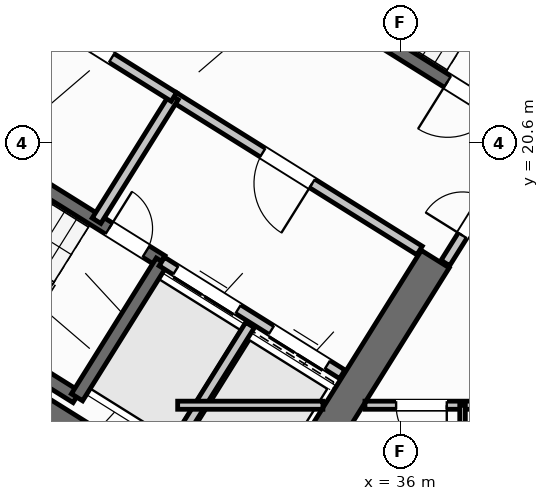
"""IFC4 building model, lengths in metres.
Left out: names, types, materials, properties, quantities, classifications, styles, units other than length and angle.
Written with IfcOpenShell. Run it as: python <this file> out.ifc"""

import sys

from ifc_helpers import new_model, si_unit, direction, frame, frame_2d, origin, place, context, subcontext, project, spatial, rectangle, extrude, source, transform, mapped, element, fill, save


model = new_model("IFC4")
c1 = context("Model", 3, precision=1e-05, world=origin(), true_north=direction((0.0, 1.0)))
c2 = subcontext(c1, "Body", "Model", "MODEL_VIEW")
j1 = project(units=[si_unit("LENGTHUNIT", "METRE"), si_unit("PLANEANGLEUNIT", "RADIAN")], contexts=[c1])
p1 = place(None, origin())
s1 = spatial("IfcSite", under=j1, at=p1, CompositionType="ELEMENT")
p2 = place(p1, origin())
s2 = spatial("IfcBuilding", under=s1, at=p2, CompositionType="ELEMENT")
p3 = place(p2, frame((0.0, 0.0, 31.2)))
s3 = spatial("IfcBuildingStorey", under=s2, at=p3, CompositionType="ELEMENT", Elevation=31.2)
p4 = place(p3, frame((33.409, 12.45, 0.0), z_axis=(0.0, 0.0, 1.0), x_axis=(-0.848051132073, 0.529914405721, 0.0)))
e1 = element("IfcWall", 1, at=p4, inside=s3, PredefinedType="SHEAR", context=c2, shape_type="SweptSolid", body=[
    extrude(rectangle(XDim=13.24, YDim=0.65, at=frame_2d((6.62, 0.0))), origin(), (0.0, 0.0, 1.0), 3.35),
])
p5 = place(p3, frame((36.683, 18.304, 0.0), z_axis=(0.0, 0.0, 1.0), x_axis=(-0.529899109053, -0.848060690178, 0.0)))
e2 = element("IfcWall", 2, at=p5, inside=s3, PredefinedType="SHEAR", context=c2, shape_type="SweptSolid", body=[
    extrude(rectangle(XDim=6.375, YDim=0.65, at=frame_2d((3.188, 0.0))), origin(), (0.0, 0.0, 1.0), 3.35),
])
p6 = place(p3, frame((29.268, 6.429, 0.0), z_axis=(0.0, 0.0, 1.0), x_axis=(-0.848049971435, 0.529916263149, 0.0)))
e3 = element("IfcWall", 3, at=p6, inside=s3, PredefinedType="STANDARD", context=c2, shape_type="SweptSolid", body=[
    extrude(rectangle(XDim=31.588, YDim=0.32, at=frame_2d((15.794, 0.0))), origin(), (0.0, 0.0, 1.0), 3.35),
])
p7 = place(p6, frame((16.362, 0.0, 0.0)))
e4 = element("IfcOpeningElement", 4, at=p7, cuts=e3, PredefinedType="OPENING", context=c2, shape_type="SweptSolid", body=[
    extrude(rectangle(XDim=1.2, YDim=2.15, at=frame_2d((0.6, 1.075))), frame((0.0, 0.17, 0.0), z_axis=(0.0, -1.0, 0.0), x_axis=(1.0, 0.0, 0.0)), (0.0, 0.0, 1.0), 0.34),
])
p8 = place(p6, frame((2.989, 0.0, 0.8)))
e5 = element("IfcOpeningElement", 5, at=p8, cuts=e3, PredefinedType="OPENING", context=c2, shape_type="SweptSolid", body=[
    extrude(rectangle(XDim=2.1, YDim=1.55, at=frame_2d((1.05, 0.775))), frame((0.0, 0.17, 0.0), z_axis=(0.0, -1.0, 0.0), x_axis=(1.0, 0.0, 0.0)), (0.0, 0.0, 1.0), 0.34),
])
p9 = place(p6, frame((8.359, 0.0, 0.8)))
e6 = element("IfcOpeningElement", 6, at=p9, cuts=e3, PredefinedType="OPENING", context=c2, shape_type="SweptSolid", body=[
    extrude(rectangle(XDim=2.1, YDim=1.55, at=frame_2d((1.05, 0.775))), frame((0.0, 0.17, 0.0), z_axis=(0.0, -1.0, 0.0), x_axis=(1.0, 0.0, 0.0)), (0.0, 0.0, 1.0), 0.34),
])
p10 = place(p6, frame((13.284, 0.0, 0.95)))
e7 = element("IfcOpeningElement", 7, at=p10, cuts=e3, PredefinedType="OPENING", context=c2, shape_type="SweptSolid", body=[
    extrude(rectangle(XDim=1.2, YDim=1.4, at=frame_2d((0.6, 0.7))), frame((0.0, 0.17, 0.0), z_axis=(0.0, -1.0, 0.0), x_axis=(1.0, 0.0, 0.0)), (0.0, 0.0, 1.0), 0.34),
])
p11 = place(p6, frame((29.188, 0.0, 0.95)))
e8 = element("IfcOpeningElement", 8, at=p11, cuts=e3, PredefinedType="OPENING", context=c2, shape_type="SweptSolid", body=[
    extrude(rectangle(XDim=1.2, YDim=1.4, at=frame_2d((0.6, 0.7))), frame((0.0, 0.17, 0.0), z_axis=(0.0, -1.0, 0.0), x_axis=(1.0, 0.0, 0.0)), (0.0, 0.0, 1.0), 0.34),
])
p12 = place(p6, frame((19.11, 0.0, 1.0)))
e9 = element("IfcOpeningElement", 9, at=p12, cuts=e3, PredefinedType="OPENING", context=c2, shape_type="SweptSolid", body=[
    extrude(rectangle(XDim=0.9, YDim=1.25, at=frame_2d((0.45, 0.625))), frame((0.0, 0.17, 0.0), z_axis=(0.0, -1.0, 0.0), x_axis=(1.0, 0.0, 0.0)), (0.0, 0.0, 1.0), 0.34),
])
p13 = place(p6, frame((21.226, 0.0, 1.0)))
e10 = element("IfcOpeningElement", 10, at=p13, cuts=e3, PredefinedType="OPENING", context=c2, shape_type="SweptSolid", body=[
    extrude(rectangle(XDim=0.9, YDim=1.25, at=frame_2d((0.45, 0.625))), frame((0.0, 0.17, 0.0), z_axis=(0.0, -1.0, 0.0), x_axis=(1.0, 0.0, 0.0)), (0.0, 0.0, 1.0), 0.34),
])
p14 = place(p6, frame((23.014, 0.0, 1.0)))
e11 = element("IfcOpeningElement", 11, at=p14, cuts=e3, PredefinedType="OPENING", context=c2, shape_type="SweptSolid", body=[
    extrude(rectangle(XDim=0.9, YDim=1.25, at=frame_2d((0.45, 0.625))), frame((0.0, 0.17, 0.0), z_axis=(0.0, -1.0, 0.0), x_axis=(1.0, 0.0, 0.0)), (0.0, 0.0, 1.0), 0.34),
])
p15 = place(p6, frame((24.802, 0.0, 1.0)))
e12 = element("IfcOpeningElement", 12, at=p15, cuts=e3, PredefinedType="OPENING", context=c2, shape_type="SweptSolid", body=[
    extrude(rectangle(XDim=0.9, YDim=1.25, at=frame_2d((0.45, 0.625))), frame((0.0, 0.17, 0.0), z_axis=(0.0, -1.0, 0.0), x_axis=(1.0, 0.0, 0.0)), (0.0, 0.0, 1.0), 0.34),
])
p16 = place(p6, frame((26.59, 0.0, 1.0)))
e13 = element("IfcOpeningElement", 13, at=p16, cuts=e3, PredefinedType="OPENING", context=c2, shape_type="SweptSolid", body=[
    extrude(rectangle(XDim=0.9, YDim=1.25, at=frame_2d((0.45, 0.625))), frame((0.0, 0.17, 0.0), z_axis=(0.0, -1.0, 0.0), x_axis=(1.0, 0.0, 0.0)), (0.0, 0.0, 1.0), 0.34),
])
p17 = place(p3, frame((29.605, 15.581, 0.0), z_axis=(0.0, 0.0, 1.0), x_axis=(-0.848036911448, 0.529937163087, 0.0)))
e14 = element("IfcWall", 14, at=p17, inside=s3, PredefinedType="SHEAR", context=c2, shape_type="SweptSolid", body=[
    extrude(rectangle(XDim=7.46, YDim=0.26, at=frame_2d((3.73, 0.0))), origin(), (0.0, 0.0, 1.0), 3.35),
])
p18 = place(p3, frame((31.28, 18.261, 0.0), z_axis=(0.0, 0.0, 1.0), x_axis=(-0.848051618787, 0.529913626805, 0.0)))
e15 = element("IfcWall", 15, at=p18, inside=s3, PredefinedType="SHEAR", context=c2, shape_type="SweptSolid", body=[
    extrude(rectangle(XDim=7.46, YDim=0.26, at=frame_2d((3.73, 0.0))), origin(), (0.0, 0.0, 1.0), 3.35),
])
p19 = place(p18, frame((0.36, 0.0, 0.0)))
e16 = element("IfcOpeningElement", 16, at=p19, cuts=e15, PredefinedType="OPENING", context=c2, shape_type="SweptSolid", body=[
    extrude(rectangle(XDim=0.86, YDim=2.05, at=frame_2d((0.43, 1.025))), frame((0.0, 0.14, 0.0), z_axis=(0.0, -1.0, 0.0), x_axis=(1.0, 0.0, 0.0)), (0.0, 0.0, 1.0), 0.28),
])
p20 = place(p3, frame((31.288, 18.256, 0.0), z_axis=(0.0, 0.0, 1.0), x_axis=(-0.529943379326, -0.848033026897, 0.0)))
e17 = element("IfcWall", 17, at=p20, inside=s3, PredefinedType="SHEAR", context=c2, shape_type="SweptSolid", body=[
    extrude(rectangle(XDim=3.16, YDim=0.26, at=frame_2d((1.58, 0.0))), origin(), (0.0, 0.0, 1.0), 3.35),
])
p21 = place(p3, frame((38.046, 21.108, 0.0), z_axis=(0.0, 0.0, 1.0), x_axis=(-0.848054434086, 0.529909121291, 0.0)))
e18 = element("IfcWall", 18, at=p21, inside=s3, PredefinedType="SHEAR", context=c2, shape_type="SweptSolid", body=[
    extrude(rectangle(XDim=7.33, YDim=0.26, at=frame_2d((3.665, 0.0))), origin(), (0.0, 0.0, 1.0), 3.35),
])
p22 = place(p21, frame((0.22, 0.0, 0.0)))
e19 = element("IfcOpeningElement", 19, at=p22, cuts=e18, PredefinedType="OPENING", context=c2, shape_type="SweptSolid", body=[
    extrude(rectangle(XDim=1.1, YDim=2.1, at=frame_2d((0.55, 1.05))), frame((0.0, 0.14, 0.0), z_axis=(0.0, -1.0, 0.0), x_axis=(1.0, 0.0, 0.0)), (0.0, 0.0, 1.0), 0.28),
])
p23 = place(p3, frame((34.848, 16.031, 0.0), z_axis=(0.0, 0.0, 1.0), x_axis=(-0.848044042236, 0.529925751807, 0.0)))
e20 = element("IfcWall", 20, at=p23, inside=s3, PredefinedType="STANDARD", context=c2, shape_type="SweptSolid", body=[
    extrude(rectangle(XDim=4.198, YDim=0.2, at=frame_2d((2.099, 0.0))), origin(), (0.0, 0.0, 1.0), 3.34),
])
p24 = place(p23, frame((0.348, 0.0, 0.0)))
e21 = element("IfcOpeningElement", 21, at=p24, cuts=e20, PredefinedType="OPENING", context=c2, shape_type="SweptSolid", body=[
    extrude(rectangle(XDim=1.3, YDim=2.2, at=frame_2d((0.65, 1.1))), frame((0.0, 0.11, 0.0), z_axis=(0.0, -1.0, 0.0), x_axis=(1.0, 0.0, 0.0)), (0.0, 0.0, 1.0), 0.22),
])
p25 = place(p23, frame((2.423, 0.0, 0.0)))
e22 = element("IfcOpeningElement", 22, at=p25, cuts=e20, PredefinedType="OPENING", context=c2, shape_type="SweptSolid", body=[
    extrude(rectangle(XDim=1.45, YDim=2.25, at=frame_2d((0.725, 1.125))), frame((0.0, 0.11, 0.0), z_axis=(0.0, -1.0, 0.0), x_axis=(1.0, 0.0, 0.0)), (0.0, 0.0, 1.0), 0.22),
])
p26 = place(p3, frame((36.374, 18.474, 0.0), z_axis=(0.0, 0.0, 1.0), x_axis=(-0.848051071577, 0.529914502535, 0.0)))
e23 = element("IfcWall", 23, at=p26, inside=s3, PredefinedType="STANDARD", context=c2, shape_type="SweptSolid", body=[
    extrude(rectangle(XDim=5.718, YDim=0.2, at=frame_2d((2.859, 0.0))), origin(), (0.0, 0.0, 1.0), 3.34),
])
p27 = place(p26, frame((2.498, 0.0, 0.0)))
e24 = element("IfcOpeningElement", 24, at=p27, cuts=e23, PredefinedType="OPENING", context=c2, shape_type="SweptSolid", body=[
    extrude(rectangle(XDim=1.15, YDim=2.1, at=frame_2d((0.575, 1.05))), frame((0.0, 0.11, 0.0), z_axis=(0.0, -1.0, 0.0), x_axis=(1.0, 0.0, 0.0)), (0.0, 0.0, 1.0), 0.22),
])
p28 = place(p3, frame((33.029, 17.003, 0.0), z_axis=(0.0, 0.0, 1.0), x_axis=(-0.529916267533, -0.848049968695, 0.0)))
e25 = element("IfcWall", 25, at=p28, inside=s3, PredefinedType="STANDARD", context=c2, shape_type="SweptSolid", body=[
    extrude(rectangle(XDim=2.92, YDim=0.2, at=frame_2d((1.46, 0.0))), origin(), (0.0, 0.0, 1.0), 3.34),
])
p29 = place(p3, frame((31.525, 21.504, 0.0), z_axis=(0.0, 0.0, 1.0), x_axis=(-0.529907497854, -0.848055448493, 0.0)))
e26 = element("IfcWall", 26, at=p29, inside=s3, PredefinedType="STANDARD", context=c2, shape_type="SweptSolid", body=[
    extrude(rectangle(XDim=2.88, YDim=0.2, at=frame_2d((1.44, 0.0))), origin(), (0.0, 0.0, 1.0), 3.34),
])
p30 = place(p3, frame((31.525, 21.504, 0.0), z_axis=(0.0, 0.0, 1.0), x_axis=(-0.848044998614, 0.529924221305, 0.0)))
e27 = element("IfcWall", 27, at=p30, inside=s3, PredefinedType="STANDARD", context=c2, shape_type="SweptSolid", body=[
    extrude(rectangle(XDim=6.168, YDim=0.2, at=frame_2d((3.084, 0.0))), origin(), (0.0, 0.0, 1.0), 3.34),
])
p31 = place(p30, frame((4.4, 0.0, 0.0)))
e28 = element("IfcOpeningElement", 28, at=p31, cuts=e27, PredefinedType="OPENING", context=c2, shape_type="SweptSolid", body=[
    extrude(rectangle(XDim=0.86, YDim=2.05, at=frame_2d((0.43, 1.025))), frame((0.0, 0.11, 0.0), z_axis=(0.0, -1.0, 0.0), x_axis=(1.0, 0.0, 0.0)), (0.0, 0.0, 1.0), 0.22),
])
p32 = place(p30, frame((1.45, 0.0, 0.0)))
e29 = element("IfcOpeningElement", 29, at=p32, cuts=e27, PredefinedType="OPENING", context=c2, shape_type="SweptSolid", body=[
    extrude(rectangle(XDim=0.86, YDim=2.05, at=frame_2d((0.43, 1.025))), frame((0.0, 0.11, 0.0), z_axis=(0.0, -1.0, 0.0), x_axis=(1.0, 0.0, 0.0)), (0.0, 0.0, 1.0), 0.22),
])
p33 = place(p3, frame((32.164, 10.374, 0.0), z_axis=(0.0, 0.0, 1.0), x_axis=(-0.848044107957, 0.529925646633, 0.0)))
e30 = element("IfcWall", 30, at=p33, inside=s3, PredefinedType="PARTITIONING", context=c2, shape_type="SweptSolid", body=[
    extrude(rectangle(XDim=15.57, YDim=0.16, at=frame_2d((7.785, 0.0))), origin(), (0.0, 0.0, 1.0), 3.34),
])
p34 = place(p33, frame((10.83, 0.0, 0.0)))
e31 = element("IfcOpeningElement", 31, at=p34, cuts=e30, PredefinedType="OPENING", context=c2, shape_type="SweptSolid", body=[
    extrude(rectangle(XDim=1.0, YDim=2.1, at=frame_2d((0.5, 1.05))), frame((0.0, 0.09, 0.0), z_axis=(0.0, -1.0, 0.0), x_axis=(1.0, 0.0, 0.0)), (0.0, 0.0, 1.0), 0.18),
])
p35 = place(p3, frame((29.72, 8.859, 0.0), z_axis=(0.0, 0.0, 1.0), x_axis=(-0.848049134363, 0.529917602752, 0.0)))
e32 = element("IfcWall", 32, at=p35, inside=s3, PredefinedType="PLUMBINGWALL", context=c2, shape_type="SweptSolid", body=[
    extrude(rectangle(XDim=14.3, YDim=0.14, at=frame_2d((7.15, 0.0))), origin(), (0.0, 0.0, 1.0), 3.34),
])
p36 = place(p35, frame((9.57, 0.0, 0.0)))
e33 = element("IfcOpeningElement", 33, at=p36, cuts=e32, PredefinedType="OPENING", context=c2, shape_type="SweptSolid", body=[
    extrude(rectangle(XDim=0.92, YDim=2.08, at=frame_2d((0.46, 1.04))), frame((0.0, 0.08, 0.0), z_axis=(0.0, -1.0, 0.0), x_axis=(1.0, 0.0, 0.0)), (0.0, 0.0, 1.0), 0.16),
])
p37 = place(p3, frame((38.451, 20.737, 0.0), z_axis=(0.0, 0.0, 1.0), x_axis=(-0.529924799939, -0.848044637038, 0.0)))
e34 = element("IfcWall", 34, at=p37, inside=s3, PredefinedType="STANDARD", context=c2, shape_type="SweptSolid", body=[
    extrude(rectangle(XDim=2.96, YDim=0.2, at=frame_2d((1.48, 0.0))), origin(), (0.0, 0.0, 1.0), 3.34),
])
p38 = place(p37, frame((1.46, 0.0, 0.0)))
e35 = element("IfcOpeningElement", 35, at=p38, cuts=e34, PredefinedType="OPENING", context=c2, shape_type="SweptSolid", body=[
    extrude(rectangle(XDim=0.86, YDim=2.05, at=frame_2d((0.43, 1.025))), frame((0.0, 0.11, 0.0), z_axis=(0.0, -1.0, 0.0), x_axis=(1.0, 0.0, 0.0)), (0.0, 0.0, 1.0), 0.22),
])
p39 = place(p3, frame((31.6, 15.42, 0.0), z_axis=(0.0, 0.0, 1.0), x_axis=(1.0, 0.0, 0.0)))
e36 = element("IfcWall", 36, at=p39, inside=s3, PredefinedType="PARTITIONING", context=c2, shape_type="SweptSolid", body=[
    extrude(rectangle(XDim=2.866, YDim=0.16, at=frame_2d((1.433, 0.0))), origin(), (0.0, 0.0, 1.0), 3.34),
])
p40 = place(p3, frame((35.296, 15.42, 0.0), z_axis=(0.0, 0.0, 1.0), x_axis=(1.0, 0.0, 0.0)))
e37 = element("IfcWall", 37, at=p40, inside=s3, PredefinedType="PARTITIONING", context=c2, shape_type="SweptSolid", body=[
    extrude(rectangle(XDim=15.311, YDim=0.16, at=frame_2d((7.655, 0.0))), origin(), (0.0, 0.0, 1.0), 3.34),
])
p41 = place(p40, frame((0.615, 0.0, 0.0)))
e38 = element("IfcOpeningElement", 38, at=p41, cuts=e37, PredefinedType="OPENING", context=c2, shape_type="SweptSolid", body=[
    extrude(rectangle(XDim=1.0, YDim=2.1, at=frame_2d((0.5, 1.05))), frame((0.0, 0.09, 0.0), z_axis=(0.0, -1.0, 0.0), x_axis=(1.0, 0.0, 0.0)), (0.0, 0.0, 1.0), 0.18),
])
p42 = place(p40, frame((9.035, 0.0, 0.0)))
e39 = element("IfcOpeningElement", 39, at=p42, cuts=e37, PredefinedType="OPENING", context=c2, shape_type="SweptSolid", body=[
    extrude(rectangle(XDim=1.0, YDim=2.1, at=frame_2d((0.5, 1.05))), frame((0.0, 0.09, 0.0), z_axis=(0.0, -1.0, 0.0), x_axis=(1.0, 0.0, 0.0)), (0.0, 0.0, 1.0), 0.18),
])
p43 = place(p3, frame((37.222, 1.96, 0.0), z_axis=(0.0, 0.0, 1.0), x_axis=(0.0, 1.0, 0.0)))
e40 = element("IfcWall", 40, at=p43, inside=s3, PredefinedType="PARTITIONING", context=c2, shape_type="SweptSolid", body=[
    extrude(rectangle(XDim=13.46, YDim=0.11, at=frame_2d((6.73, 0.0))), origin(), (0.0, 0.0, 1.0), 3.34),
])
p44 = place(p43, frame((5.2, 0.0, 0.0)))
e41 = element("IfcOpeningElement", 41, at=p44, cuts=e40, PredefinedType="OPENING", context=c2, shape_type="SweptSolid", body=[
    extrude(rectangle(XDim=0.92, YDim=2.08, at=frame_2d((0.46, 1.04))), frame((0.0, 0.065, 0.0), z_axis=(0.0, -1.0, 0.0), x_axis=(1.0, 0.0, 0.0)), (0.0, 0.0, 1.0), 0.13),
])
p45 = place(p43, frame((10.45, 0.0, 0.0)))
e42 = element("IfcOpeningElement", 42, at=p45, cuts=e40, PredefinedType="OPENING", context=c2, shape_type="SweptSolid", body=[
    extrude(rectangle(XDim=0.88, YDim=2.08, at=frame_2d((0.44, 1.04))), frame((0.0, 0.065, 0.0), z_axis=(0.0, -1.0, 0.0), x_axis=(1.0, 0.0, 0.0)), (0.0, 0.0, 1.0), 0.13),
])
m1 = source(origin(), c2, "Body", "SweptSolid", [
    extrude(rectangle(XDim=0.86, YDim=2.05, at=frame_2d((0.43, 1.025))), frame((0.0, 0.025, 0.0), z_axis=(0.0, -1.0, 0.0), x_axis=(1.0, 0.0, 0.0)), (0.0, 0.0, 1.0), 0.05),
])
p46 = place(p19, frame((0.86, 0.0, 0.0), z_axis=(0.0, 0.0, 1.0), x_axis=(-1.0, 0.0, 0.0)))
e43 = element("IfcDoor", 43, at=p46, inside=s3, OperationType="SINGLE_SWING_LEFT", PredefinedType="DOOR", context=c2, shape_type="MappedRepresentation", body=[
    mapped(m1, transform((0.0, 0.0, 0.0), scale=1.0)),
])
fill(e16, e43)
m2 = source(origin(), c2, "Body", "SweptSolid", [
    extrude(rectangle(XDim=1.1, YDim=2.1, at=frame_2d((0.55, 1.05))), frame((0.0, 0.025, 0.0), z_axis=(0.0, -1.0, 0.0), x_axis=(1.0, 0.0, 0.0)), (0.0, 0.0, 1.0), 0.05),
])
p47 = place(p22, origin())
e44 = element("IfcDoor", 44, at=p47, inside=s3, OperationType="SINGLE_SWING_RIGHT", PredefinedType="DOOR", context=c2, shape_type="MappedRepresentation", body=[
    mapped(m2, transform((0.0, 0.0, 0.0), scale=1.0)),
])
fill(e19, e44)
m3 = source(origin(), c2, "Body", "SweptSolid", [
    extrude(rectangle(XDim=1.15, YDim=2.1, at=frame_2d((0.575, 1.05))), frame((0.0, 0.025, 0.0), z_axis=(0.0, -1.0, 0.0), x_axis=(1.0, 0.0, 0.0)), (0.0, 0.0, 1.0), 0.05),
])
p48 = place(p27, origin())
e45 = element("IfcDoor", 45, at=p48, inside=s3, OperationType="SINGLE_SWING_LEFT", PredefinedType="DOOR", context=c2, shape_type="MappedRepresentation", body=[
    mapped(m3, transform((0.0, 0.0, 0.0), scale=1.0)),
])
fill(e24, e45)
m4 = source(origin(), c2, "Body", "SweptSolid", [
    extrude(rectangle(XDim=1.3, YDim=2.2, at=frame_2d((0.65, 1.1))), frame((0.0, 0.025, 0.0), z_axis=(0.0, -1.0, 0.0), x_axis=(1.0, 0.0, 0.0)), (0.0, 0.0, 1.0), 0.05),
])
p49 = place(p24, origin())
e46 = element("IfcDoor", 46, at=p49, inside=s3, OperationType="DOUBLE_DOOR_SLIDING", PredefinedType="DOOR", context=c2, shape_type="MappedRepresentation", body=[
    mapped(m4, transform((0.0, 0.0, 0.0), scale=1.0)),
])
fill(e21, e46)
m5 = source(origin(), c2, "Body", "SweptSolid", [
    extrude(rectangle(XDim=1.45, YDim=2.25, at=frame_2d((0.725, 1.125))), frame((0.0, 0.025, 0.0), z_axis=(0.0, -1.0, 0.0), x_axis=(1.0, 0.0, 0.0)), (0.0, 0.0, 1.0), 0.05),
])
p50 = place(p25, origin())
e47 = element("IfcDoor", 47, at=p50, inside=s3, OperationType="DOUBLE_DOOR_SLIDING", PredefinedType="DOOR", context=c2, shape_type="MappedRepresentation", body=[
    mapped(m5, transform((0.0, 0.0, 0.0), scale=1.0)),
])
fill(e22, e47)
p51 = place(p32, frame((0.86, 0.0, 0.0), z_axis=(0.0, 0.0, 1.0), x_axis=(-1.0, 0.0, 0.0)))
e48 = element("IfcDoor", 48, at=p51, inside=s3, OperationType="SINGLE_SWING_LEFT", PredefinedType="DOOR", context=c2, shape_type="MappedRepresentation", body=[
    mapped(m1, transform((0.0, 0.0, 0.0), scale=1.0)),
])
fill(e29, e48)
p52 = place(p38, frame((0.86, 0.0, 0.0), z_axis=(0.0, 0.0, 1.0), x_axis=(-1.0, 0.0, 0.0)))
e49 = element("IfcDoor", 49, at=p52, inside=s3, OperationType="SINGLE_SWING_LEFT", PredefinedType="DOOR", context=c2, shape_type="MappedRepresentation", body=[
    mapped(m1, transform((0.0, 0.0, 0.0), scale=1.0)),
])
fill(e35, e49)
m6 = source(origin(), c2, "Body", "SweptSolid", [
    extrude(rectangle(XDim=1.0, YDim=2.1, at=frame_2d((0.5, 1.05))), frame((0.0, 0.025, 0.0), z_axis=(0.0, -1.0, 0.0), x_axis=(1.0, 0.0, 0.0)), (0.0, 0.0, 1.0), 0.05),
])
p53 = place(p41, frame((1.0, 0.0, 0.0), z_axis=(0.0, 0.0, 1.0), x_axis=(-1.0, 0.0, 0.0)))
e50 = element("IfcDoor", 50, at=p53, inside=s3, OperationType="SINGLE_SWING_LEFT", PredefinedType="DOOR", context=c2, shape_type="MappedRepresentation", body=[
    mapped(m6, transform((0.0, 0.0, 0.0), scale=1.0)),
])
fill(e38, e50)
save(model, sys.argv[1])
